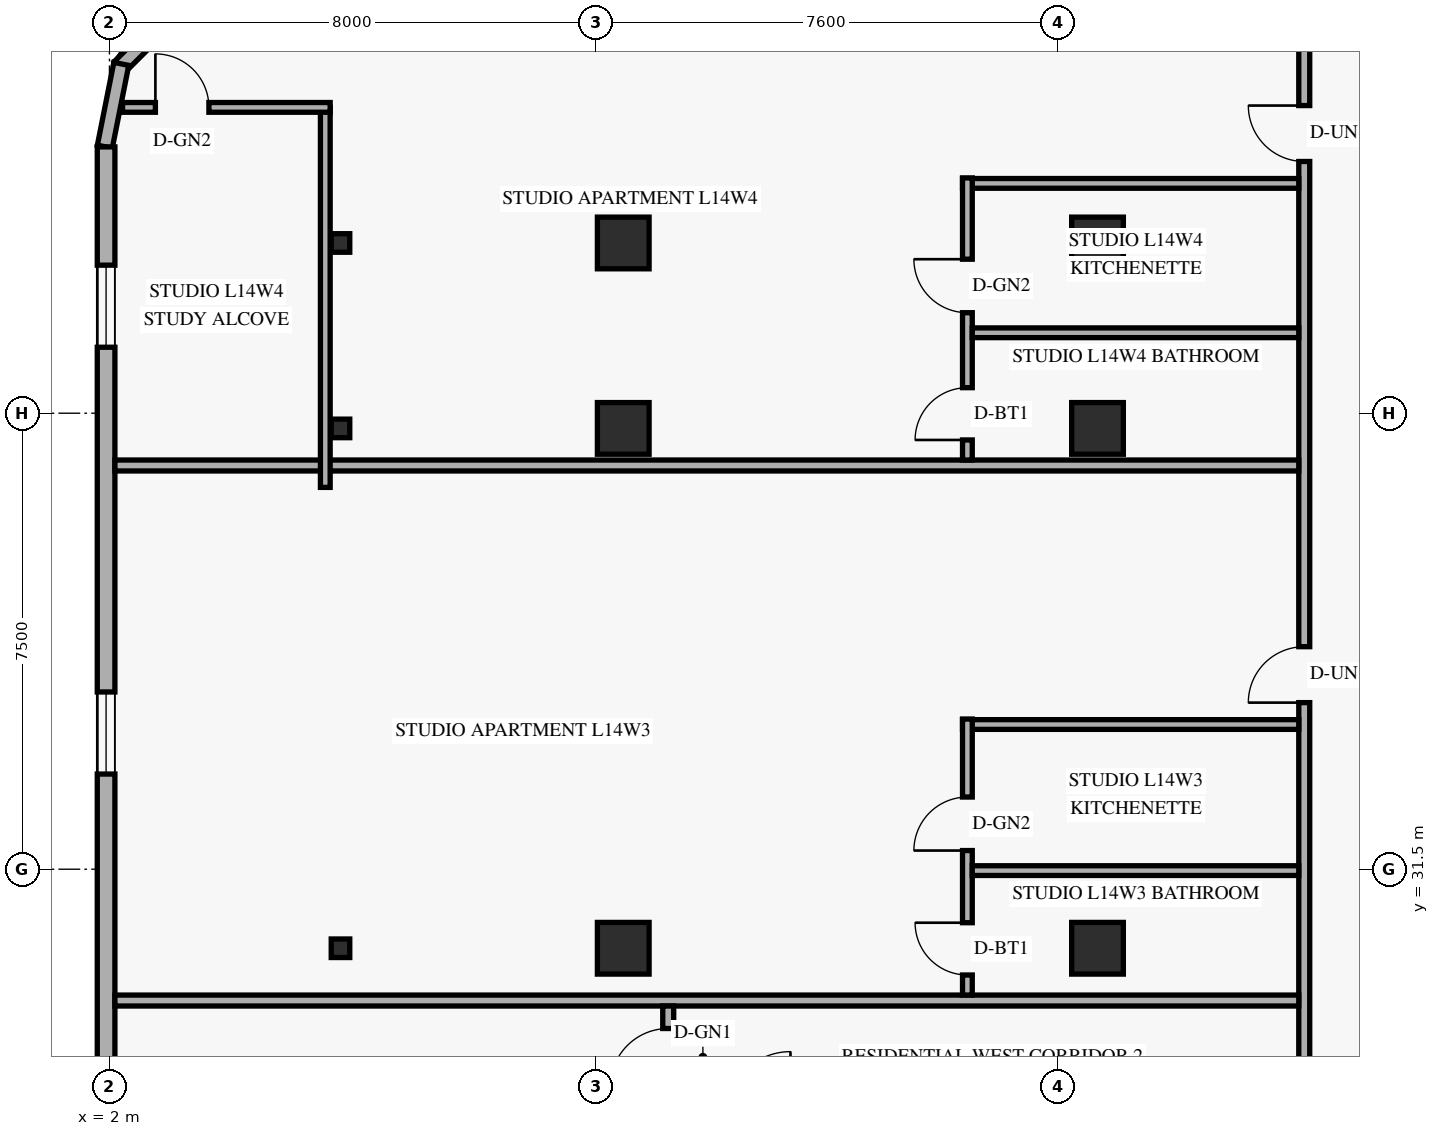
"""IFC4 building model, lengths in metres.
Left out: names, types, materials, properties, quantities, classifications, styles, units other than length and angle.
Written with IfcOpenShell. Run it as: python <this file> out.ifc"""

import sys

from ifc_helpers import new_model, si_unit, direction, frame, frame_2d, origin, origin_2d, place, context, subcontext, project, spatial, rectangle, hollow_rectangle, extrude, element, fill, save


model = new_model("IFC4")
c1 = context("Model", 3, precision=1e-05, world=origin(), true_north=direction((0.0, 1.0)))
c2 = subcontext(c1, "Body", "Model", "MODEL_VIEW")
j1 = project(units=[si_unit("LENGTHUNIT", "METRE"), si_unit("PLANEANGLEUNIT", "RADIAN")], contexts=[c1])
p1 = place(None, origin())
s1 = spatial("IfcSite", under=j1, at=p1, CompositionType="ELEMENT")
p2 = place(p1, origin())
s2 = spatial("IfcBuilding", under=s1, at=p2, CompositionType="ELEMENT")
p3 = place(p2, frame((0.0, 0.0, 56.4)))
s3 = spatial("IfcBuildingStorey", under=s2, at=p3, CompositionType="ELEMENT", Elevation=56.4)
for number, where, z_axis, x_axis in (
    (1, (5.8, 30.2, 0.0), (0.0, 0.0, 1.0), (1.0, 0.0, 0.0)),
    (2, (5.8, 38.75, 0.0), (0.0, 0.0, 1.0), (1.0, 0.0, 0.0)),
    (3, (5.8, 41.8, 0.0), (0.0, 0.0, 1.0), (1.0, 0.0, 0.0)),
):
    element("IfcColumn", number, at=place(p3, frame(where, z_axis=z_axis, x_axis=x_axis)), inside=s3, PredefinedType="COLUMN", context=c2, shape_type="SweptSolid", body=[
        extrude(hollow_rectangle(XDim=0.305, YDim=0.305, WallThickness=0.013, at=origin_2d()), origin(), (0.0, 0.0, 1.0), 3.6),
    ])
for number, where, z_axis, x_axis in (
    (4, (10.45, 30.2, 0.0), (0.0, 0.0, 1.0), (1.0, 0.0, 0.0)),
    (5, (10.45, 38.75, 0.0), (0.0, 0.0, 1.0), (1.0, 0.0, 0.0)),
    (6, (10.45, 41.8, 0.0), (0.0, 0.0, 1.0), (1.0, 0.0, 0.0)),
    (7, (18.25, 30.2, 0.0), (0.0, 0.0, 1.0), (1.0, 0.0, 0.0)),
    (8, (18.25, 38.75, 0.0), (0.0, 0.0, 1.0), (1.0, 0.0, 0.0)),
    (9, (18.25, 41.8, 0.0), (0.0, 0.0, 1.0), (1.0, 0.0, 0.0)),
):
    element("IfcColumn", number, at=place(p3, frame(where, z_axis=z_axis, x_axis=x_axis)), inside=s3, PredefinedType="COLUMN", context=c2, shape_type="SweptSolid", body=[
        extrude(rectangle(XDim=0.85, YDim=0.85, at=origin_2d()), origin(), (0.0, 0.0, 1.0), 3.6),
    ])
p4 = place(p3, frame((4.105, 46.632, 0.0), z_axis=(0.0, 0.0, 1.0), x_axis=(-0.707106781187, -0.707106781187, 0.0)))
e10 = element("IfcWall", 10, at=p4, inside=s3, PredefinedType="SOLIDWALL", context=c2, shape_type="SweptSolid", body=[
    extrude(rectangle(XDim=2.739, YDim=0.25, at=frame_2d((1.37, 0.0))), origin(), (0.0, 0.0, 1.0), 3.35),
])
p5 = place(p4, frame((0.77, 0.0, 0.85)))
e11 = element("IfcOpeningElement", 11, at=p5, cuts=e10, PredefinedType="OPENING", context=c2, shape_type="SweptSolid", body=[
    extrude(rectangle(XDim=1.2, YDim=1.5, at=frame_2d((0.6, 0.75))), frame((0.0, 0.135, 0.0), z_axis=(0.0, -1.0, 0.0), x_axis=(1.0, 0.0, 0.0)), (0.0, 0.0, 1.0), 0.27),
])
p6 = place(p3, frame((2.195, 44.746, 0.0), z_axis=(0.0, 0.0, 1.0), x_axis=(-0.19496651342, -0.980809899341, 0.0)))
e12 = element("IfcWall", 12, at=p6, inside=s3, PredefinedType="SOLIDWALL", context=c2, shape_type="SweptSolid", body=[
    extrude(rectangle(XDim=1.389, YDim=0.25, at=frame_2d((0.694, 0.0))), origin(), (0.0, 0.0, 1.0), 3.35),
])
p7 = place(p3, frame((1.945, 43.38, 0.0), z_axis=(0.0, 0.0, 1.0), x_axis=(0.0, -1.0, 0.0)))
e13 = element("IfcWall", 13, at=p7, inside=s3, PredefinedType="SOLIDWALL", context=c2, shape_type="SweptSolid", body=[
    extrude(rectangle(XDim=38.76, YDim=0.29, at=frame_2d((19.38, 0.0))), origin(), (0.0, 0.0, 1.0), 3.35),
])
p8 = place(p7, frame((35.212, 0.0, 0.85)))
e14 = element("IfcOpeningElement", 14, at=p8, cuts=e13, PredefinedType="OPENING", context=c2, shape_type="SweptSolid", body=[
    extrude(rectangle(XDim=1.35, YDim=1.55, at=frame_2d((0.675, 0.775))), frame((0.0, 0.155, 0.0), z_axis=(0.0, -1.0, 0.0), x_axis=(1.0, 0.0, 0.0)), (0.0, 0.0, 1.0), 0.31),
])
p9 = place(p7, frame((27.677, 0.0, 0.85)))
e15 = element("IfcOpeningElement", 15, at=p9, cuts=e13, PredefinedType="OPENING", context=c2, shape_type="SweptSolid", body=[
    extrude(rectangle(XDim=1.35, YDim=1.55, at=frame_2d((0.675, 0.775))), frame((0.0, 0.155, 0.0), z_axis=(0.0, -1.0, 0.0), x_axis=(1.0, 0.0, 0.0)), (0.0, 0.0, 1.0), 0.31),
])
p10 = place(p7, frame((18.19, 0.0, 0.85)))
e16 = element("IfcOpeningElement", 16, at=p10, cuts=e13, PredefinedType="OPENING", context=c2, shape_type="SweptSolid", body=[
    extrude(rectangle(XDim=1.35, YDim=1.55, at=frame_2d((0.675, 0.775))), frame((0.0, 0.155, 0.0), z_axis=(0.0, -1.0, 0.0), x_axis=(1.0, 0.0, 0.0)), (0.0, 0.0, 1.0), 0.31),
])
p11 = place(p7, frame((8.965, 0.0, 0.85)))
e17 = element("IfcOpeningElement", 17, at=p11, cuts=e13, PredefinedType="OPENING", context=c2, shape_type="SweptSolid", body=[
    extrude(rectangle(XDim=1.35, YDim=1.55, at=frame_2d((0.675, 0.775))), frame((0.0, 0.155, 0.0), z_axis=(0.0, -1.0, 0.0), x_axis=(1.0, 0.0, 0.0)), (0.0, 0.0, 1.0), 0.31),
])
p12 = place(p7, frame((1.945, 0.0, 0.85)))
e18 = element("IfcOpeningElement", 18, at=p12, cuts=e13, PredefinedType="OPENING", context=c2, shape_type="SweptSolid", body=[
    extrude(rectangle(XDim=1.35, YDim=1.55, at=frame_2d((0.675, 0.775))), frame((0.0, 0.155, 0.0), z_axis=(0.0, -1.0, 0.0), x_axis=(1.0, 0.0, 0.0)), (0.0, 0.0, 1.0), 0.31),
])
p13 = place(p3, frame((21.65, 1.29, 0.0), z_axis=(0.0, 0.0, 1.0), x_axis=(0.0, 1.0, 0.0)))
e19 = element("IfcWall", 19, at=p13, inside=s3, PredefinedType="STANDARD", context=c2, shape_type="SweptSolid", body=[
    extrude(rectangle(XDim=45.42, YDim=0.18, at=frame_2d((22.71, 0.0))), origin(), (0.0, 0.0, 1.0), 2.639),
])
p14 = place(p13, frame((3.135, 0.0, 0.0)))
e20 = element("IfcOpeningElement", 20, at=p14, cuts=e19, PredefinedType="OPENING", context=c2, shape_type="SweptSolid", body=[
    extrude(rectangle(XDim=0.92, YDim=2.15, at=frame_2d((0.46, 1.075))), frame((0.0, 0.1, 0.0), z_axis=(0.0, -1.0, 0.0), x_axis=(1.0, 0.0, 0.0)), (0.0, 0.0, 1.0), 0.2),
])
p15 = place(p13, frame((13.975, 0.0, 0.0)))
e21 = element("IfcOpeningElement", 21, at=p15, cuts=e19, PredefinedType="OPENING", context=c2, shape_type="SweptSolid", body=[
    extrude(rectangle(XDim=0.92, YDim=2.15, at=frame_2d((0.46, 1.075))), frame((0.0, 0.1, 0.0), z_axis=(0.0, -1.0, 0.0), x_axis=(1.0, 0.0, 0.0)), (0.0, 0.0, 1.0), 0.2),
])
p16 = place(p13, frame((20.91, 0.0, 0.0)))
e22 = element("IfcOpeningElement", 22, at=p16, cuts=e19, PredefinedType="OPENING", context=c2, shape_type="SweptSolid", body=[
    extrude(rectangle(XDim=0.95, YDim=2.15, at=frame_2d((0.475, 1.075))), frame((0.0, 0.1, 0.0), z_axis=(0.0, -1.0, 0.0), x_axis=(1.0, 0.0, 0.0)), (0.0, 0.0, 1.0), 0.2),
])
p17 = place(p13, frame((32.95, 0.0, 0.0)))
e23 = element("IfcOpeningElement", 23, at=p17, cuts=e19, PredefinedType="OPENING", context=c2, shape_type="SweptSolid", body=[
    extrude(rectangle(XDim=0.92, YDim=2.15, at=frame_2d((0.46, 1.075))), frame((0.0, 0.1, 0.0), z_axis=(0.0, -1.0, 0.0), x_axis=(1.0, 0.0, 0.0)), (0.0, 0.0, 1.0), 0.2),
])
p18 = place(p13, frame((41.85, 0.0, 0.0)))
e24 = element("IfcOpeningElement", 24, at=p18, cuts=e19, PredefinedType="OPENING", context=c2, shape_type="SweptSolid", body=[
    extrude(rectangle(XDim=0.92, YDim=2.15, at=frame_2d((0.46, 1.075))), frame((0.0, 0.1, 0.0), z_axis=(0.0, -1.0, 0.0), x_axis=(1.0, 0.0, 0.0)), (0.0, 0.0, 1.0), 0.2),
])
p19 = place(p3, frame((2.09, 29.34, 0.0), z_axis=(0.0, 0.0, 1.0), x_axis=(1.0, 0.0, 0.0)))
e25 = element("IfcWall", 25, at=p19, inside=s3, PredefinedType="STANDARD", context=c2, shape_type="SweptSolid", body=[
    extrude(rectangle(XDim=19.47, YDim=0.18, at=frame_2d((9.735, 0.0))), origin(), (0.0, 0.0, 1.0), 2.639),
])
p20 = place(p3, frame((11.19, 27.45, 0.0), z_axis=(0.0, 0.0, 1.0), x_axis=(0.0, 1.0, 0.0)))
e26 = element("IfcWall", 26, at=p20, inside=s3, PredefinedType="STANDARD", context=c2, shape_type="SweptSolid", body=[
    extrude(rectangle(XDim=1.8, YDim=0.18, at=frame_2d((0.9, 0.0))), origin(), (0.0, 0.0, 1.0), 2.639),
])
p21 = place(p20, frame((0.48, 0.0, 0.0)))
e27 = element("IfcOpeningElement", 27, at=p21, cuts=e26, PredefinedType="OPENING", context=c2, shape_type="SweptSolid", body=[
    extrude(rectangle(XDim=0.95, YDim=2.15, at=frame_2d((0.475, 1.075))), frame((0.0, 0.1, 0.0), z_axis=(0.0, -1.0, 0.0), x_axis=(1.0, 0.0, 0.0)), (0.0, 0.0, 1.0), 0.2),
])
p22 = place(p3, frame((2.09, 38.14, 0.0), z_axis=(0.0, 0.0, 1.0), x_axis=(1.0, 0.0, 0.0)))
e28 = element("IfcWall", 28, at=p22, inside=s3, PredefinedType="PARTITIONING", context=c2, shape_type="SweptSolid", body=[
    extrude(rectangle(XDim=19.47, YDim=0.18, at=frame_2d((9.735, 0.0))), origin(), (0.0, 0.0, 1.0), 2.639),
])
p23 = place(p3, frame((16.03, 33.88, 0.0), z_axis=(0.0, 0.0, 1.0), x_axis=(1.0, 0.0, 0.0)))
e29 = element("IfcWall", 29, at=p23, inside=s3, PredefinedType="PLUMBINGWALL", context=c2, shape_type="SweptSolid", body=[
    extrude(rectangle(XDim=5.53, YDim=0.16, at=frame_2d((2.765, 0.0))), origin(), (0.0, 0.0, 1.0), 2.639),
])
p24 = place(p3, frame((16.11, 29.43, 0.0), z_axis=(0.0, 0.0, 1.0), x_axis=(0.0, 1.0, 0.0)))
e30 = element("IfcWall", 30, at=p24, inside=s3, PredefinedType="PLUMBINGWALL", context=c2, shape_type="SweptSolid", body=[
    extrude(rectangle(XDim=4.54, YDim=0.16, at=frame_2d((2.27, 0.0))), origin(), (0.0, 0.0, 1.0), 2.639),
])
p25 = place(p24, frame((0.33, 0.0, 0.0)))
e31 = element("IfcOpeningElement", 31, at=p25, cuts=e30, PredefinedType="OPENING", context=c2, shape_type="SweptSolid", body=[
    extrude(rectangle(XDim=0.86, YDim=2.12, at=frame_2d((0.43, 1.06))), frame((0.0, 0.09, 0.0), z_axis=(0.0, -1.0, 0.0), x_axis=(1.0, 0.0, 0.0)), (0.0, 0.0, 1.0), 0.18),
])
p26 = place(p24, frame((2.377, 0.0, 0.0)))
e32 = element("IfcOpeningElement", 32, at=p26, cuts=e30, PredefinedType="OPENING", context=c2, shape_type="SweptSolid", body=[
    extrude(rectangle(XDim=0.88, YDim=2.12, at=frame_2d((0.44, 1.06))), frame((0.0, 0.09, 0.0), z_axis=(0.0, -1.0, 0.0), x_axis=(1.0, 0.0, 0.0)), (0.0, 0.0, 1.0), 0.18),
])
p27 = place(p3, frame((16.19, 31.477, 0.0), z_axis=(0.0, 0.0, 1.0), x_axis=(1.0, 0.0, 0.0)))
e33 = element("IfcWall", 33, at=p27, inside=s3, PredefinedType="PLUMBINGWALL", context=c2, shape_type="SweptSolid", body=[
    extrude(rectangle(XDim=5.37, YDim=0.16, at=frame_2d((2.685, 0.0))), origin(), (0.0, 0.0, 1.0), 2.639),
])
p28 = place(p3, frame((16.03, 42.78, 0.0), z_axis=(0.0, 0.0, 1.0), x_axis=(1.0, 0.0, 0.0)))
e34 = element("IfcWall", 34, at=p28, inside=s3, PredefinedType="PLUMBINGWALL", context=c2, shape_type="SweptSolid", body=[
    extrude(rectangle(XDim=5.53, YDim=0.16, at=frame_2d((2.765, 0.0))), origin(), (0.0, 0.0, 1.0), 3.35),
])
p29 = place(p3, frame((16.11, 38.23, 0.0), z_axis=(0.0, 0.0, 1.0), x_axis=(0.0, 1.0, 0.0)))
e35 = element("IfcWall", 35, at=p29, inside=s3, PredefinedType="PLUMBINGWALL", context=c2, shape_type="SweptSolid", body=[
    extrude(rectangle(XDim=4.64, YDim=0.16, at=frame_2d((2.32, 0.0))), origin(), (0.0, 0.0, 1.0), 2.639),
])
p30 = place(p29, frame((0.33, 0.0, 0.0)))
e36 = element("IfcOpeningElement", 36, at=p30, cuts=e35, PredefinedType="OPENING", context=c2, shape_type="SweptSolid", body=[
    extrude(rectangle(XDim=0.86, YDim=2.12, at=frame_2d((0.43, 1.06))), frame((0.0, 0.09, 0.0), z_axis=(0.0, -1.0, 0.0), x_axis=(1.0, 0.0, 0.0)), (0.0, 0.0, 1.0), 0.18),
])
p31 = place(p29, frame((2.423, 0.0, 0.0)))
e37 = element("IfcOpeningElement", 37, at=p31, cuts=e35, PredefinedType="OPENING", context=c2, shape_type="SweptSolid", body=[
    extrude(rectangle(XDim=0.88, YDim=2.12, at=frame_2d((0.44, 1.06))), frame((0.0, 0.09, 0.0), z_axis=(0.0, -1.0, 0.0), x_axis=(1.0, 0.0, 0.0)), (0.0, 0.0, 1.0), 0.18),
])
p32 = place(p3, frame((16.19, 40.323, 0.0), z_axis=(0.0, 0.0, 1.0), x_axis=(1.0, 0.0, 0.0)))
e38 = element("IfcWall", 38, at=p32, inside=s3, PredefinedType="PLUMBINGWALL", context=c2, shape_type="SweptSolid", body=[
    extrude(rectangle(XDim=5.37, YDim=0.16, at=frame_2d((2.685, 0.0))), origin(), (0.0, 0.0, 1.0), 2.639),
])
p33 = place(p3, frame((5.55, 37.78, 0.0), z_axis=(0.0, 0.0, 1.0), x_axis=(0.0, 1.0, 0.0)))
e39 = element("IfcWall", 39, at=p33, inside=s3, PredefinedType="PARTITIONING", context=c2, shape_type="SweptSolid", body=[
    extrude(rectangle(XDim=6.25, YDim=0.16, at=frame_2d((3.125, 0.0))), origin(), (0.0, 0.0, 1.0), 3.35),
])
p34 = place(p3, frame((2.216, 44.03, 0.0), z_axis=(0.0, 0.0, 1.0), x_axis=(1.0, 0.0, 0.0)))
e40 = element("IfcWall", 40, at=p34, inside=s3, PredefinedType="PARTITIONING", context=c2, shape_type="SweptSolid", body=[
    extrude(rectangle(XDim=3.414, YDim=0.16, at=frame_2d((1.707, 0.0))), origin(), (0.0, 0.0, 1.0), 3.35),
])
p35 = place(p34, frame((0.54, 0.0, 0.0)))
e41 = element("IfcOpeningElement", 41, at=p35, cuts=e40, PredefinedType="OPENING", context=c2, shape_type="SweptSolid", body=[
    extrude(rectangle(XDim=0.88, YDim=2.12, at=frame_2d((0.44, 1.06))), frame((0.0, 0.09, 0.0), z_axis=(0.0, -1.0, 0.0), x_axis=(1.0, 0.0, 0.0)), (0.0, 0.0, 1.0), 0.18),
])
p36 = place(p11, origin())
e42 = element("IfcWindow", 42, at=p36, inside=s3, PartitioningType="SINGLE_PANEL", PredefinedType="WINDOW", context=c2, shape_type="SweptSolid", body=[
    extrude(rectangle(XDim=1.35, YDim=1.55, at=frame_2d((0.675, 0.775))), frame((0.0, 0.03, 0.0), z_axis=(0.0, -1.0, 0.0), x_axis=(1.0, 0.0, 0.0)), (0.0, 0.0, 1.0), 0.06),
])
fill(e17, e42)
p37 = place(p12, origin())
e43 = element("IfcWindow", 43, at=p37, inside=s3, PartitioningType="SINGLE_PANEL", PredefinedType="WINDOW", context=c2, shape_type="SweptSolid", body=[
    extrude(rectangle(XDim=1.35, YDim=1.55, at=frame_2d((0.675, 0.775))), frame((0.0, 0.03, 0.0), z_axis=(0.0, -1.0, 0.0), x_axis=(1.0, 0.0, 0.0)), (0.0, 0.0, 1.0), 0.06),
])
fill(e18, e43)
p38 = place(p21, origin())
e44 = element("IfcDoor", 44, at=p38, inside=s3, OperationType="SINGLE_SWING_LEFT", PredefinedType="DOOR", context=c2, shape_type="SweptSolid", body=[
    extrude(rectangle(XDim=0.95, YDim=2.15, at=frame_2d((0.475, 1.075))), frame((0.0, 0.025, 0.0), z_axis=(0.0, -1.0, 0.0), x_axis=(1.0, 0.0, 0.0)), (0.0, 0.0, 1.0), 0.05),
])
fill(e27, e44)
p39 = place(p17, origin())
e45 = element("IfcDoor", 45, at=p39, inside=s3, OperationType="SINGLE_SWING_LEFT", PredefinedType="DOOR", context=c2, shape_type="SweptSolid", body=[
    extrude(rectangle(XDim=0.92, YDim=2.15, at=frame_2d((0.46, 1.075))), frame((0.0, 0.025, 0.0), z_axis=(0.0, -1.0, 0.0), x_axis=(1.0, 0.0, 0.0)), (0.0, 0.0, 1.0), 0.05),
])
fill(e23, e45)
p40 = place(p25, origin())
e46 = element("IfcDoor", 46, at=p40, inside=s3, OperationType="SINGLE_SWING_RIGHT", PredefinedType="DOOR", context=c2, shape_type="SweptSolid", body=[
    extrude(rectangle(XDim=0.86, YDim=2.12, at=frame_2d((0.43, 1.06))), frame((0.0, 0.025, 0.0), z_axis=(0.0, -1.0, 0.0), x_axis=(1.0, 0.0, 0.0)), (0.0, 0.0, 1.0), 0.05),
])
fill(e31, e46)
p41 = place(p26, origin())
e47 = element("IfcDoor", 47, at=p41, inside=s3, OperationType="SINGLE_SWING_LEFT", PredefinedType="DOOR", context=c2, shape_type="SweptSolid", body=[
    extrude(rectangle(XDim=0.88, YDim=2.12, at=frame_2d((0.44, 1.06))), frame((0.0, 0.025, 0.0), z_axis=(0.0, -1.0, 0.0), x_axis=(1.0, 0.0, 0.0)), (0.0, 0.0, 1.0), 0.05),
])
fill(e32, e47)
p42 = place(p35, origin())
e48 = element("IfcDoor", 48, at=p42, inside=s3, OperationType="SINGLE_SWING_LEFT", PredefinedType="DOOR", context=c2, shape_type="SweptSolid", body=[
    extrude(rectangle(XDim=0.88, YDim=2.12, at=frame_2d((0.44, 1.06))), frame((0.0, 0.025, 0.0), z_axis=(0.0, -1.0, 0.0), x_axis=(1.0, 0.0, 0.0)), (0.0, 0.0, 1.0), 0.05),
])
fill(e41, e48)
p43 = place(p18, origin())
e49 = element("IfcDoor", 49, at=p43, inside=s3, OperationType="SINGLE_SWING_RIGHT", PredefinedType="DOOR", context=c2, shape_type="SweptSolid", body=[
    extrude(rectangle(XDim=0.92, YDim=2.15, at=frame_2d((0.46, 1.075))), frame((0.0, 0.025, 0.0), z_axis=(0.0, -1.0, 0.0), x_axis=(1.0, 0.0, 0.0)), (0.0, 0.0, 1.0), 0.05),
])
fill(e24, e49)
p44 = place(p30, origin())
e50 = element("IfcDoor", 50, at=p44, inside=s3, OperationType="SINGLE_SWING_LEFT", PredefinedType="DOOR", context=c2, shape_type="SweptSolid", body=[
    extrude(rectangle(XDim=0.86, YDim=2.12, at=frame_2d((0.43, 1.06))), frame((0.0, 0.025, 0.0), z_axis=(0.0, -1.0, 0.0), x_axis=(1.0, 0.0, 0.0)), (0.0, 0.0, 1.0), 0.05),
])
fill(e36, e50)
p45 = place(p31, origin())
e51 = element("IfcDoor", 51, at=p45, inside=s3, OperationType="SINGLE_SWING_RIGHT", PredefinedType="DOOR", context=c2, shape_type="SweptSolid", body=[
    extrude(rectangle(XDim=0.88, YDim=2.12, at=frame_2d((0.44, 1.06))), frame((0.0, 0.025, 0.0), z_axis=(0.0, -1.0, 0.0), x_axis=(1.0, 0.0, 0.0)), (0.0, 0.0, 1.0), 0.05),
])
fill(e37, e51)
save(model, sys.argv[1])
